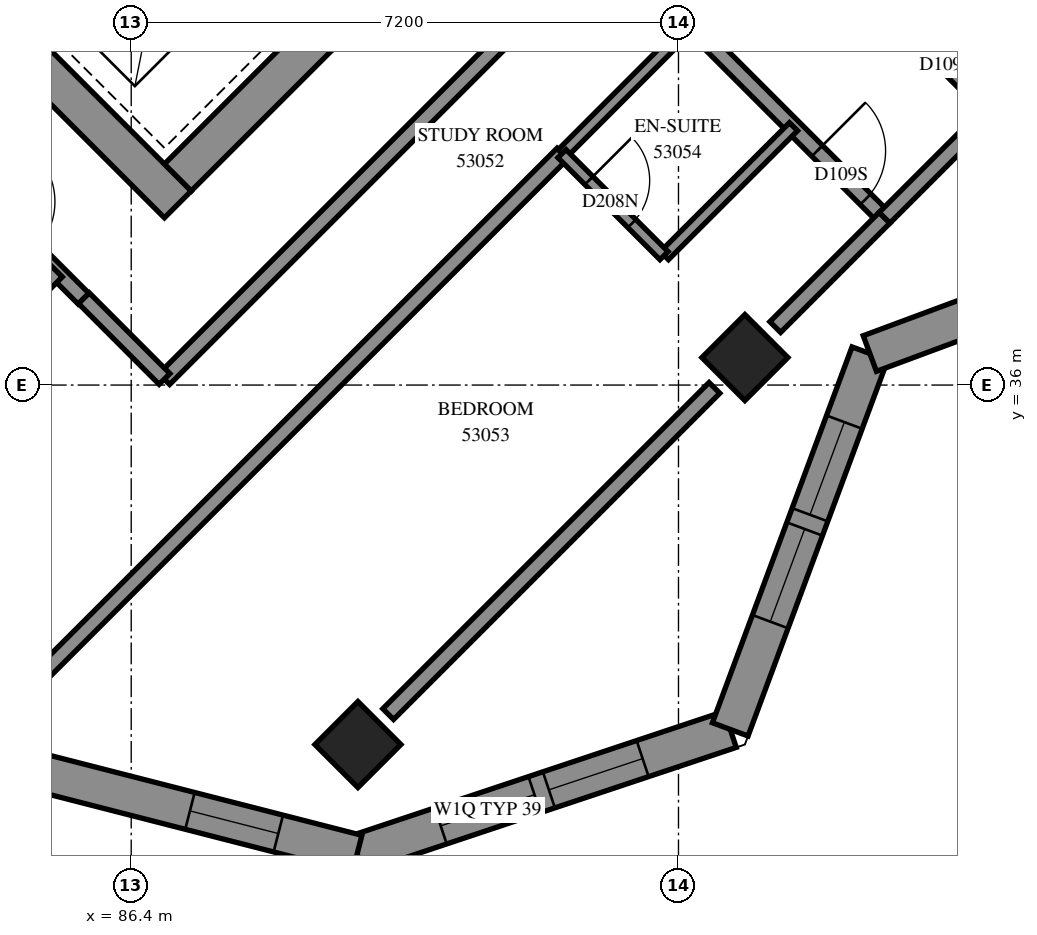
"""IFC4 building model, lengths in metres.
Left out: names, types, materials, properties, quantities, classifications, styles, units other than length and angle.
Written with IfcOpenShell. Run it as: python <this file> out.ifc"""

import sys

from ifc_helpers import new_model, si_unit, direction, frame, frame_2d, origin, origin_2d, place, context, subcontext, project, spatial, polyline, rectangle, outline, extrude, element, fill, save


model = new_model("IFC4")
c1 = context("Model", 3, precision=1e-05, world=origin(), true_north=direction((0.0, 1.0)))
c2 = subcontext(c1, "Body", "Model", "MODEL_VIEW")
j1 = project(units=[si_unit("LENGTHUNIT", "METRE"), si_unit("PLANEANGLEUNIT", "RADIAN")], contexts=[c1])
p1 = place(None, origin())
s1 = spatial("IfcSite", under=j1, at=p1, CompositionType="ELEMENT")
p2 = place(p1, origin())
s2 = spatial("IfcBuilding", under=s1, at=p2, CompositionType="ELEMENT")
p3 = place(p2, frame((0.0, 0.0, 196.4)))
s3 = spatial("IfcBuildingStorey", under=s2, at=p3, CompositionType="ELEMENT", Elevation=196.4)
for number, where, z_axis, x_axis in (
    (1, (94.474, 36.362, 0.0), (0.0, 0.0, 1.0), (0.707, -0.707, 0.0)),
    (2, (89.382, 31.271, 0.0), (0.0, 0.0, 1.0), (0.707, -0.707, 0.0)),
):
    element("IfcColumn", number, at=place(p3, frame(where, z_axis=z_axis, x_axis=x_axis)), inside=s3, PredefinedType="COLUMN", context=c2, shape_type="SweptSolid", body=[
        extrude(rectangle(XDim=0.8, YDim=0.8, at=origin_2d()), origin(), (0.0, 0.0, 1.0), 3.1),
    ])
p4 = place(p3, frame((76.124, 49.267, -0.3), z_axis=(0.0, 0.0, 1.0), x_axis=(0.7071067812, -0.7071067812, 0.0)))
e3 = element("IfcWall", 3, at=p4, inside=s3, PredefinedType="SHEAR", context=c2, shape_type="SweptSolid", body=[
    extrude(rectangle(XDim=15.4, YDim=0.5, at=frame_2d((7.7, 0.0))), origin(), (0.0, 0.0, 1.0), 2.7),
])
p5 = place(p3, frame((87.013, 38.731, -0.3), z_axis=(0.0, 0.0, 1.0), x_axis=(0.7071067812, 0.7071067812, 0.0)))
e4 = element("IfcWall", 4, at=p5, inside=s3, PredefinedType="SHEAR", context=c2, shape_type="SweptSolid", body=[
    extrude(rectangle(XDim=14.4, YDim=0.5, at=frame_2d((7.2, 0.0))), origin(), (0.0, 0.0, 1.0), 2.7),
])
p6 = place(p5, frame((4.55, 0.0, 0.3)))
e5 = element("IfcOpeningElement", 5, at=p6, cuts=e4, PredefinedType="OPENING", context=c2, shape_type="SweptSolid", body=[
    extrude(rectangle(XDim=1.1, YDim=2.1, at=frame_2d((0.55, 1.05))), frame((0.0, 0.26, 0.0), z_axis=(0.0, -1.0, 0.0), x_axis=(1.0, 0.0, 0.0)), (0.0, 0.0, 1.0), 0.52),
])
p7 = place(p5, frame((11.35, 0.0, 0.3)))
e6 = element("IfcOpeningElement", 6, at=p7, cuts=e4, PredefinedType="OPENING", context=c2, shape_type="SweptSolid", body=[
    extrude(rectangle(XDim=1.1, YDim=2.1, at=frame_2d((0.55, 1.05))), frame((0.0, 0.26, 0.0), z_axis=(0.0, -1.0, 0.0), x_axis=(1.0, 0.0, 0.0)), (0.0, 0.0, 1.0), 0.52),
])
p8 = place(p3, frame((89.373, 29.834, 0.0), z_axis=(0.0, 0.0, 1.0), x_axis=(0.9486832981, 0.316227766, 0.0)))
e7 = element("IfcWall", 7, at=p8, inside=s3, PredefinedType="SOLIDWALL", context=c2, shape_type="SweptSolid", body=[
    extrude(outline(polyline([(-0.074, -0.25), (5.293, -0.25), (5.053, 0.25), (0.074, 0.25), (-0.074, -0.25)])), origin(), (0.0, 0.0, 1.0), 3.1),
])
p9 = place(p8, frame((1.158, 0.0, 0.45)))
e8 = element("IfcOpeningElement", 8, at=p9, cuts=e7, PredefinedType="OPENING", context=c2, shape_type="SweptSolid", body=[
    extrude(rectangle(XDim=1.3, YDim=2.5, at=frame_2d((0.65, 1.25))), frame((0.0, 0.26, 0.0), z_axis=(0.0, -1.0, 0.0), x_axis=(1.0, 0.0, 0.0)), (0.0, 0.0, 1.0), 0.52),
])
p10 = place(p8, frame((2.658, 0.0, 0.45)))
e9 = element("IfcOpeningElement", 9, at=p10, cuts=e7, PredefinedType="OPENING", context=c2, shape_type="SweptSolid", body=[
    extrude(rectangle(XDim=1.3, YDim=2.5, at=frame_2d((0.65, 1.25))), frame((0.0, 0.26, 0.0), z_axis=(0.0, -1.0, 0.0), x_axis=(1.0, 0.0, 0.0)), (0.0, 0.0, 1.0), 0.52),
])
p11 = place(p3, frame((94.281, 31.47, 0.0), z_axis=(0.0, 0.0, 1.0), x_axis=(0.3481903374, 0.9374238577, 0.0)))
e10 = element("IfcWall", 10, at=p11, inside=s3, PredefinedType="SOLIDWALL", context=c2, shape_type="SweptSolid", body=[
    extrude(outline(polyline([(-0.12, -0.25), (5.16, -0.25), (5.39, 0.25), (0.12, 0.25), (-0.12, -0.25)])), origin(), (0.0, 0.0, 1.0), 3.1),
])
p12 = place(p11, frame((1.512, 0.0, 0.45)))
e11 = element("IfcOpeningElement", 11, at=p12, cuts=e10, PredefinedType="OPENING", context=c2, shape_type="SweptSolid", body=[
    extrude(rectangle(XDim=1.3, YDim=2.5, at=frame_2d((0.65, 1.25))), frame((0.0, 0.26, 0.0), z_axis=(0.0, -1.0, 0.0), x_axis=(1.0, 0.0, 0.0)), (0.0, 0.0, 1.0), 0.52),
])
p13 = place(p11, frame((3.012, 0.0, 0.45)))
e12 = element("IfcOpeningElement", 12, at=p13, cuts=e10, PredefinedType="OPENING", context=c2, shape_type="SweptSolid", body=[
    extrude(rectangle(XDim=1.3, YDim=2.5, at=frame_2d((0.65, 1.25))), frame((0.0, 0.26, 0.0), z_axis=(0.0, -1.0, 0.0), x_axis=(1.0, 0.0, 0.0)), (0.0, 0.0, 1.0), 0.52),
])
p14 = place(p3, frame((96.118, 36.415, 0.0), z_axis=(0.0, 0.0, 1.0), x_axis=(0.9374238577, 0.3481903374, 0.0)))
e13 = element("IfcWall", 13, at=p14, inside=s3, PredefinedType="SOLIDWALL", context=c2, shape_type="SweptSolid", body=[
    extrude(outline(polyline([(0.115, -0.25), (5.395, -0.25), (5.155, 0.25), (-0.115, 0.25), (0.115, -0.25)])), origin(), (0.0, 0.0, 1.0), 3.1),
])
p15 = place(p14, frame((1.655, 0.0, 0.45)))
e14 = element("IfcOpeningElement", 14, at=p15, cuts=e13, PredefinedType="OPENING", context=c2, shape_type="SweptSolid", body=[
    extrude(rectangle(XDim=1.3, YDim=2.5, at=frame_2d((0.65, 1.25))), frame((0.0, 0.26, 0.0), z_axis=(0.0, -1.0, 0.0), x_axis=(1.0, 0.0, 0.0)), (0.0, 0.0, 1.0), 0.52),
])
p16 = place(p14, frame((3.155, 0.0, 0.45)))
e15 = element("IfcOpeningElement", 15, at=p16, cuts=e13, PredefinedType="OPENING", context=c2, shape_type="SweptSolid", body=[
    extrude(rectangle(XDim=1.3, YDim=2.5, at=frame_2d((0.65, 1.25))), frame((0.0, 0.26, 0.0), z_axis=(0.0, -1.0, 0.0), x_axis=(1.0, 0.0, 0.0)), (0.0, 0.0, 1.0), 0.52),
])
p17 = place(p3, frame((85.018, 30.95, 0.0), z_axis=(0.0, 0.0, 1.0), x_axis=(0.9687021408, -0.2482260308, 0.0)))
e16 = element("IfcWall", 16, at=p17, inside=s3, PredefinedType="SOLIDWALL", context=c2, shape_type="SweptSolid", body=[
    extrude(outline(polyline([(-0.142, -0.25), (4.569, -0.25), (4.422, 0.25), (0.142, 0.25), (-0.142, -0.25)])), origin(), (0.0, 0.0, 1.0), 3.1),
])
p18 = place(p17, frame((2.224, 0.0, 0.45)))
e17 = element("IfcOpeningElement", 17, at=p18, cuts=e16, PredefinedType="OPENING", context=c2, shape_type="SweptSolid", body=[
    extrude(rectangle(XDim=1.2, YDim=2.5, at=frame_2d((0.6, 1.25))), frame((0.0, 0.26, 0.0), z_axis=(0.0, -1.0, 0.0), x_axis=(1.0, 0.0, 0.0)), (0.0, 0.0, 1.0), 0.52),
])
p19 = place(p3, frame((84.981, 31.956, 0.0), z_axis=(0.0, 0.0, 1.0), x_axis=(0.7072314232, 0.7069821172, 0.0)))
e18 = element("IfcWall", 18, at=p19, inside=s3, PredefinedType="PARTITIONING", context=c2, shape_type="SweptSolid", body=[
    extrude(rectangle(XDim=10.028, YDim=0.2, at=frame_2d((5.014, 0.0))), origin(), (0.0, 0.0, 1.0), 3.1),
])
p20 = place(p3, frame((86.835, 36.079, 0.0), z_axis=(0.0, 0.0, 1.0), x_axis=(0.7071067812, 0.7071067812, 0.0)))
e19 = element("IfcWall", 19, at=p20, inside=s3, PredefinedType="PARTITIONING", context=c2, shape_type="SweptSolid", body=[
    extrude(rectangle(XDim=8.2, YDim=0.2, at=frame_2d((4.1, 0.0))), origin(), (0.0, 0.0, 1.0), 3.1),
])
p21 = place(p3, frame((80.849, 42.061, 0.0), z_axis=(0.0, 0.0, 1.0), x_axis=(0.7071067812, -0.7071067812, 0.0)))
e20 = element("IfcWall", 20, at=p21, inside=s3, PredefinedType="PARTITIONING", context=c2, shape_type="SweptSolid", body=[
    extrude(rectangle(XDim=6.964, YDim=0.2, at=frame_2d((3.482, 0.0))), origin(), (0.0, 0.0, 1.0), 3.1),
])
p22 = place(p21, frame((5.159, 0.0, 0.0)))
e21 = element("IfcOpeningElement", 21, at=p22, cuts=e20, PredefinedType="OPENING", context=c2, shape_type="SweptSolid", body=[
    extrude(rectangle(XDim=0.9, YDim=2.1, at=frame_2d((0.45, 1.05))), frame((0.0, 0.11, 0.0), z_axis=(0.0, -1.0, 0.0), x_axis=(1.0, 0.0, 0.0)), (0.0, 0.0, 1.0), 0.22),
])
p23 = place(p3, frame((89.781, 31.671, 0.0), z_axis=(0.0, 0.0, 1.0), x_axis=(0.7071067812, 0.7071067812, 0.0)))
e22 = element("IfcWall", 22, at=p23, inside=s3, PredefinedType="PARTITIONING", context=c2, shape_type="SweptSolid", body=[
    extrude(rectangle(XDim=6.07, YDim=0.2, at=frame_2d((3.035, 0.0))), origin(), (0.0, 0.0, 1.0), 2.6),
])
p24 = place(p3, frame((94.047, 43.287, 0.0), z_axis=(0.0, 0.0, 1.0), x_axis=(0.7071067812, -0.7071067812, 0.0)))
e23 = element("IfcWall", 23, at=p24, inside=s3, PredefinedType="PARTITIONING", context=c2, shape_type="SweptSolid", body=[
    extrude(rectangle(XDim=5.199, YDim=0.2, at=frame_2d((2.599, 0.0))), origin(), (0.0, 0.0, 1.0), 3.1),
])
p25 = place(p24, frame((3.898, 0.0, 0.0)))
e24 = element("IfcOpeningElement", 24, at=p25, cuts=e23, PredefinedType="OPENING", context=c2, shape_type="SweptSolid", body=[
    extrude(rectangle(XDim=0.9, YDim=2.1, at=frame_2d((0.45, 1.05))), frame((0.0, 0.11, 0.0), z_axis=(0.0, -1.0, 0.0), x_axis=(1.0, 0.0, 0.0)), (0.0, 0.0, 1.0), 0.22),
])
p26 = place(p3, frame((92.633, 41.873, 0.0), z_axis=(0.0, 0.0, 1.0), x_axis=(0.7071067812, -0.7071067812, 0.0)))
e25 = element("IfcWall", 25, at=p26, inside=s3, PredefinedType="PARTITIONING", context=c2, shape_type="SweptSolid", body=[
    extrude(rectangle(XDim=5.199, YDim=0.2, at=frame_2d((2.599, 0.0))), origin(), (0.0, 0.0, 1.0), 3.1),
])
p27 = place(p26, frame((0.253, 0.0, 0.0)))
e26 = element("IfcOpeningElement", 26, at=p27, cuts=e25, PredefinedType="OPENING", context=c2, shape_type="SweptSolid", body=[
    extrude(rectangle(XDim=1.0, YDim=2.1, at=frame_2d((0.5, 1.05))), frame((0.0, 0.11, 0.0), z_axis=(0.0, -1.0, 0.0), x_axis=(1.0, 0.0, 0.0)), (0.0, 0.0, 1.0), 0.22),
])
p28 = place(p26, frame((3.948, 0.0, 0.0)))
e27 = element("IfcOpeningElement", 27, at=p28, cuts=e25, PredefinedType="OPENING", context=c2, shape_type="SweptSolid", body=[
    extrude(rectangle(XDim=0.9, YDim=2.1, at=frame_2d((0.45, 1.05))), frame((0.0, 0.11, 0.0), z_axis=(0.0, -1.0, 0.0), x_axis=(1.0, 0.0, 0.0)), (0.0, 0.0, 1.0), 0.22),
])
for number, where, z_axis, x_axis in (
    (28, (92.072, 39.046, 0.0), (0.0, 0.0, 1.0), (0.707, 0.708, 0.0)),
    (29, (93.415, 37.703, 0.0), (0.0, 0.0, 1.0), (0.708, 0.707, 0.0)),
):
    element("IfcWall", number, at=place(p3, frame(where, z_axis=z_axis, x_axis=x_axis)), inside=s3, PredefinedType="PARTITIONING", context=c2, shape_type="SweptSolid", body=[
        extrude(rectangle(XDim=2.4, YDim=0.15, at=frame_2d((1.2, 0.0))), origin(), (0.0, 0.0, 1.0), 3.1),
    ])
p29 = place(p3, frame((94.873, 36.763, 0.0), z_axis=(0.0, 0.0, 1.0), x_axis=(0.7071067812, 0.7071067812, 0.0)))
e30 = element("IfcWall", 30, at=p29, inside=s3, PredefinedType="PARTITIONING", context=c2, shape_type="SweptSolid", body=[
    extrude(rectangle(XDim=2.034, YDim=0.2, at=frame_2d((1.017, 0.0))), origin(), (0.0, 0.0, 1.0), 2.6),
])
p30 = place(p3, frame((96.311, 38.201, 0.0), z_axis=(0.0, 0.0, 1.0), x_axis=(0.7071067812, 0.7071067812, 0.0)))
e31 = element("IfcWall", 31, at=p30, inside=s3, PredefinedType="PARTITIONING", context=c2, shape_type="SweptSolid", body=[
    extrude(rectangle(XDim=2.0, YDim=0.2, at=frame_2d((1.0, 0.0))), origin(), (0.0, 0.0, 1.0), 2.6),
])
p31 = place(p3, frame((92.067, 39.045, 0.0), z_axis=(0.0, 0.0, 1.0), x_axis=(0.7071067812, -0.7071067812, 0.0)))
e32 = element("IfcWall", 32, at=p31, inside=s3, PredefinedType="PARTITIONING", context=c2, shape_type="SweptSolid", body=[
    extrude(rectangle(XDim=1.898, YDim=0.15, at=frame_2d((0.949, 0.0))), origin(), (0.0, 0.0, 1.0), 3.1),
])
p32 = place(p31, frame((0.501, 0.0, 0.0)))
e33 = element("IfcOpeningElement", 33, at=p32, cuts=e32, PredefinedType="OPENING", context=c2, shape_type="SweptSolid", body=[
    extrude(rectangle(XDim=0.8, YDim=2.1, at=frame_2d((0.4, 1.05))), frame((0.0, 0.085, 0.0), z_axis=(0.0, -1.0, 0.0), x_axis=(1.0, 0.0, 0.0)), (0.0, 0.0, 1.0), 0.17),
])
p33 = place(p3, frame((85.778, 37.142, 0.0), z_axis=(0.0, 0.0, 1.0), x_axis=(0.7064400143, -0.70777292, 0.0)))
e34 = element("IfcWall", 34, at=p33, inside=s3, PredefinedType="PARTITIONING", context=c2, shape_type="SweptSolid", body=[
    extrude(rectangle(XDim=1.5, YDim=0.2, at=frame_2d((0.75, 0.0))), origin(), (0.0, 0.0, 1.0), 3.1),
])
p34 = place(p3, frame((84.693, 36.761, 0.0), z_axis=(0.0, 0.0, 1.0), x_axis=(0.7061388061, 0.708073433, 0.0)))
e35 = element("IfcWall", 35, at=p34, inside=s3, PredefinedType="PARTITIONING", context=c2, shape_type="SweptSolid", body=[
    extrude(rectangle(XDim=1.034, YDim=0.2, at=frame_2d((0.517, 0.0))), origin(), (0.0, 0.0, 1.0), 3.1),
])
p35 = place(p9, origin())
e36 = element("IfcWindow", 36, at=p35, inside=s3, PartitioningType="SINGLE_PANEL", PredefinedType="WINDOW", context=c2, shape_type="SweptSolid", body=[
    extrude(rectangle(XDim=1.3, YDim=2.5, at=frame_2d((0.65, 1.25))), frame((0.0, 0.18, 0.0), z_axis=(0.0, -1.0, 0.0), x_axis=(1.0, 0.0, 0.0)), (0.0, 0.0, 1.0), 0.06),
])
fill(e8, e36)
p36 = place(p10, origin())
e37 = element("IfcWindow", 37, at=p36, inside=s3, PartitioningType="SINGLE_PANEL", PredefinedType="WINDOW", context=c2, shape_type="SweptSolid", body=[
    extrude(rectangle(XDim=1.3, YDim=2.5, at=frame_2d((0.65, 1.25))), frame((0.0, 0.18, 0.0), z_axis=(0.0, -1.0, 0.0), x_axis=(1.0, 0.0, 0.0)), (0.0, 0.0, 1.0), 0.06),
])
fill(e9, e37)
p37 = place(p12, origin())
e38 = element("IfcWindow", 38, at=p37, inside=s3, PartitioningType="SINGLE_PANEL", PredefinedType="WINDOW", context=c2, shape_type="SweptSolid", body=[
    extrude(rectangle(XDim=1.3, YDim=2.5, at=frame_2d((0.65, 1.25))), frame((0.0, 0.18, 0.0), z_axis=(0.0, -1.0, 0.0), x_axis=(1.0, 0.0, 0.0)), (0.0, 0.0, 1.0), 0.06),
])
fill(e11, e38)
p38 = place(p13, origin())
e39 = element("IfcWindow", 39, at=p38, inside=s3, PartitioningType="SINGLE_PANEL", PredefinedType="WINDOW", context=c2, shape_type="SweptSolid", body=[
    extrude(rectangle(XDim=1.3, YDim=2.5, at=frame_2d((0.65, 1.25))), frame((0.0, 0.18, 0.0), z_axis=(0.0, -1.0, 0.0), x_axis=(1.0, 0.0, 0.0)), (0.0, 0.0, 1.0), 0.06),
])
fill(e12, e39)
p39 = place(p18, origin())
e40 = element("IfcWindow", 40, at=p39, inside=s3, PartitioningType="SINGLE_PANEL", PredefinedType="WINDOW", context=c2, shape_type="SweptSolid", body=[
    extrude(rectangle(XDim=1.2, YDim=2.5, at=frame_2d((0.6, 1.25))), frame((0.0, 0.18, 0.0), z_axis=(0.0, -1.0, 0.0), x_axis=(1.0, 0.0, 0.0)), (0.0, 0.0, 1.0), 0.06),
])
fill(e17, e40)
p40 = place(p28, origin())
e41 = element("IfcDoor", 41, at=p40, inside=s3, OperationType="SINGLE_SWING_LEFT", PredefinedType="DOOR", context=c2, shape_type="SweptSolid", body=[
    extrude(rectangle(XDim=0.9, YDim=2.1, at=frame_2d((0.45, 1.05))), frame((0.0, 0.025, 0.0), z_axis=(0.0, -1.0, 0.0), x_axis=(1.0, 0.0, 0.0)), (0.0, 0.0, 1.0), 0.05),
])
fill(e27, e41)
p41 = place(p32, origin())
e42 = element("IfcDoor", 42, at=p41, inside=s3, OperationType="SINGLE_SWING_RIGHT", PredefinedType="DOOR", context=c2, shape_type="SweptSolid", body=[
    extrude(rectangle(XDim=0.8, YDim=2.1, at=frame_2d((0.4, 1.05))), frame((0.0, 0.025, 0.0), z_axis=(0.0, -1.0, 0.0), x_axis=(1.0, 0.0, 0.0)), (0.0, 0.0, 1.0), 0.05),
])
fill(e33, e42)
p42 = place(p25, origin())
e43 = element("IfcDoor", 43, at=p42, inside=s3, OperationType="SINGLE_SWING_RIGHT", PredefinedType="DOOR", context=c2, shape_type="SweptSolid", body=[
    extrude(rectangle(XDim=0.9, YDim=2.1, at=frame_2d((0.45, 1.05))), frame((0.0, 0.025, 0.0), z_axis=(0.0, -1.0, 0.0), x_axis=(1.0, 0.0, 0.0)), (0.0, 0.0, 1.0), 0.05),
])
fill(e24, e43)
save(model, sys.argv[1])
